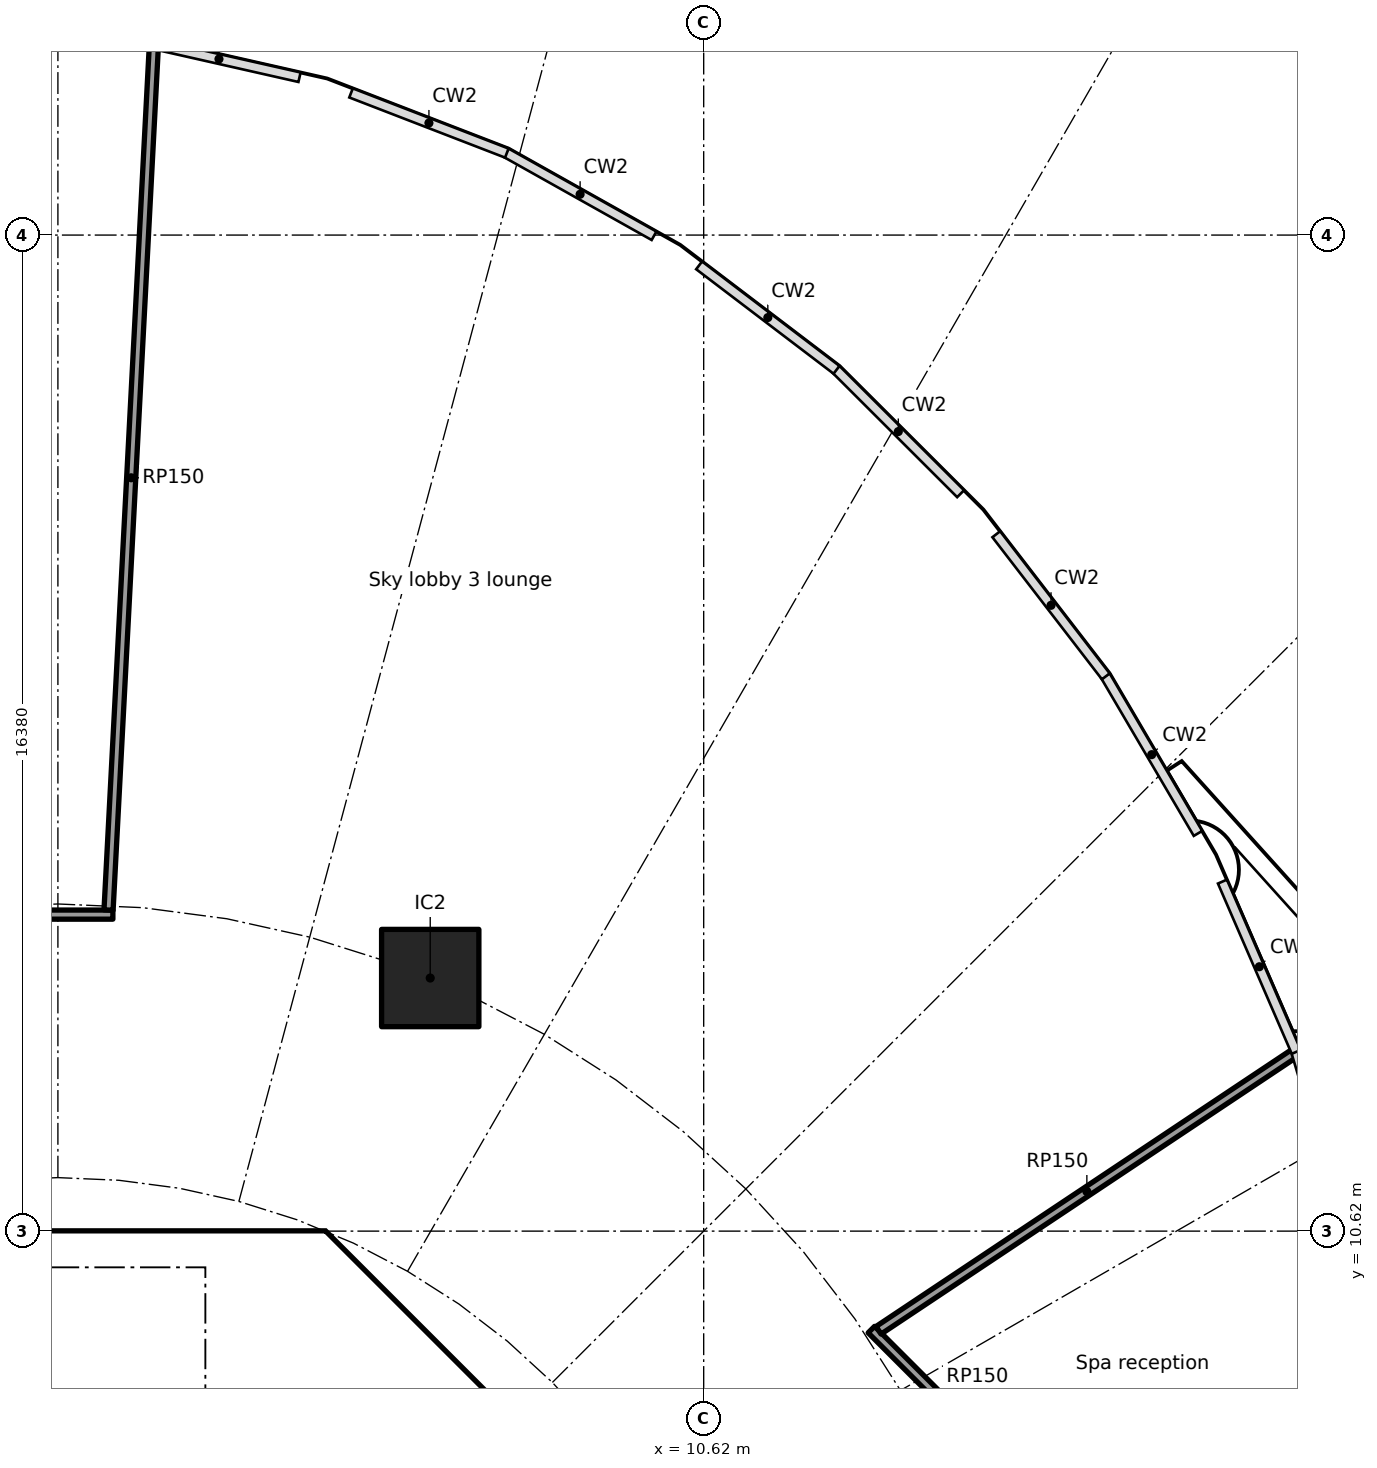
"""IFC4 building model, lengths in metres.
Left out: names, types, materials, properties, quantities, classifications, styles, units other than length and angle.
Written with IfcOpenShell. Run it as: python <this file> out.ifc"""

import sys

from ifc_helpers import new_model, si_unit, direction, frame, frame_2d, origin, origin_2d, place, context, subcontext, project, spatial, polyline, rectangle, outline, extrude, element, fill, save


model = new_model("IFC4")
c1 = context("Model", 3, precision=1e-05, world=origin(), true_north=direction((0.0, 1.0)))
c2 = subcontext(c1, "Body", "Model", "MODEL_VIEW")
j1 = project(units=[si_unit("LENGTHUNIT", "METRE"), si_unit("PLANEANGLEUNIT", "RADIAN")], contexts=[c1])
p1 = place(None, origin())
s1 = spatial("IfcSite", under=j1, at=p1, CompositionType="ELEMENT")
p2 = place(p1, origin())
s2 = spatial("IfcBuilding", under=s1, at=p2, CompositionType="ELEMENT")
p3 = place(p2, frame((0.0, 0.0, 252.9)))
s3 = spatial("IfcBuildingStorey", under=s2, at=p3, CompositionType="ELEMENT", Elevation=252.9)
p4 = place(p3, frame((6.123, 14.782, 0.0), z_axis=(0.0, 0.0, 1.0), x_axis=(1.0, 0.0, 0.0)))
e1 = element("IfcColumn", 1, at=p4, inside=s3, PredefinedType="COLUMN", context=c2, shape_type="SweptSolid", body=[
    extrude(rectangle(XDim=1.6, YDim=1.6, at=origin_2d()), origin(), (0.0, 0.0, 1.0), 5.6),
])
p5 = place(p3, frame((9.988, 4.613, 0.0), z_axis=(0.0, 0.0, 1.0), x_axis=(-0.707106781187, 0.707106781187, 0.0)))
e2 = element("IfcWall", 2, at=p5, inside=s3, PredefinedType="SHEAR", context=c2, shape_type="SweptSolid", body=[
    extrude(rectangle(XDim=7.602, YDim=0.6, at=frame_2d((3.801, 0.0))), origin(), (0.0, 0.0, 1.0), 5.34),
])
p6 = place(p5, frame((3.201, 0.0, 0.0)))
e3 = element("IfcOpeningElement", 3, at=p6, cuts=e2, PredefinedType="OPENING", context=c2, shape_type="SweptSolid", body=[
    extrude(rectangle(XDim=1.2, YDim=2.1, at=frame_2d((0.6, 1.05))), frame((0.0, 0.31, 0.0), z_axis=(0.0, -1.0, 0.0), x_axis=(1.0, 0.0, 0.0)), (0.0, 0.0, 1.0), 0.62),
])
p7 = place(p3, frame((4.0, 7.025, 0.0), z_axis=(0.0, 0.0, 1.0), x_axis=(0.0, 1.0, 0.0)))
e4 = element("IfcWall", 4, at=p7, inside=s3, PredefinedType="SOLIDWALL", context=c2, shape_type="SweptSolid", body=[
    extrude(rectangle(XDim=3.0, YDim=0.2, at=frame_2d((1.5, 0.0))), origin(), (0.0, 0.0, 1.0), 5.34),
])
p8 = place(p7, frame((0.925, 0.0, 0.0)))
e5 = element("IfcOpeningElement", 5, at=p8, cuts=e4, PredefinedType="OPENING", context=c2, shape_type="SweptSolid", body=[
    extrude(rectangle(XDim=1.1, YDim=2.1, at=frame_2d((0.55, 1.05))), frame((0.0, 0.11, 0.0), z_axis=(0.0, -1.0, 0.0), x_axis=(1.0, 0.0, 0.0)), (0.0, 0.0, 1.0), 0.22),
])
p9 = place(p3, origin())
e6 = element("IfcWall", 6, at=p9, inside=s3, PredefinedType="SHEAR", context=c2, shape_type="SweptSolid", body=[
    extrude(outline(polyline([(-4.152, 10.025), (-4.401, 9.776), (-4.825, 10.2), (-4.401, 10.625), (4.401, 10.625), (4.825, 10.2), (4.401, 9.776), (4.152, 10.025), (-4.152, 10.025)])), origin(), (0.0, 0.0, 1.0), 5.34),
])
p10 = place(p3, frame((-6.449, 15.825, 0.0), z_axis=(0.0, 0.0, 1.0), x_axis=(1.0, 0.0, 0.0)))
e7 = element("IfcWall", 7, at=p10, inside=s3, PredefinedType="PARTITIONING", context=c2, shape_type="SweptSolid", body=[
    extrude(rectangle(XDim=7.353, YDim=0.15, at=frame_2d((3.677, 0.0))), origin(), (0.0, 0.0, 1.0), 5.34),
])
p11 = place(p10, frame((2.686, 0.0, 0.0)))
e8 = element("IfcOpeningElement", 8, at=p11, cuts=e7, PredefinedType="OPENING", context=c2, shape_type="SweptSolid", body=[
    extrude(rectangle(XDim=1.8, YDim=2.1, at=frame_2d((0.9, 1.05))), frame((0.0, 0.085, 0.0), z_axis=(0.0, -1.0, 0.0), x_axis=(1.0, 0.0, 0.0)), (0.0, 0.0, 1.0), 0.17),
])
p12 = place(p3, frame((0.833, 15.9, 0.0), z_axis=(0.0, 0.0, 1.0), x_axis=(0.052336520132, 0.998629505202, 0.0)))
e9 = element("IfcWall", 9, at=p12, inside=s3, PredefinedType="PARTITIONING", context=c2, shape_type="SweptSolid", body=[
    extrude(rectangle(XDim=14.237, YDim=0.15, at=frame_2d((7.119, 0.0))), origin(), (0.0, 0.0, 1.0), 5.34),
])
p13 = place(p3, frame((13.378, 9.001, 0.0), z_axis=(0.0, 0.0, 1.0), x_axis=(0.707243697976, -0.70696983788, 0.0)))
e10 = element("IfcWall", 10, at=p13, inside=s3, PredefinedType="PARTITIONING", context=c2, shape_type="SweptSolid", body=[
    extrude(rectangle(XDim=3.566, YDim=0.15, at=frame_2d((1.783, 0.0))), origin(), (0.0, 0.0, 1.0), 5.34),
])
p14 = place(p3, frame((20.347, 13.554, 0.0), z_axis=(0.0, 0.0, 1.0), x_axis=(-0.832246423535, -0.554405889681, 0.0)))
e11 = element("IfcWall", 11, at=p14, inside=s3, PredefinedType="PARTITIONING", context=c2, shape_type="SweptSolid", body=[
    extrude(rectangle(XDim=8.233, YDim=0.15, at=frame_2d((4.116, 0.0))), origin(), (0.0, 0.0, 1.0), 5.34),
])
p15 = place(p8, origin())
e12 = element("IfcDoor", 12, at=p15, inside=s3, OperationType="SINGLE_SWING_LEFT", PredefinedType="DOOR", context=c2, shape_type="SweptSolid", body=[
    extrude(rectangle(XDim=1.1, YDim=2.1, at=frame_2d((0.55, 1.05))), frame((0.0, 0.025, 0.0), z_axis=(0.0, -1.0, 0.0), x_axis=(1.0, 0.0, 0.0)), (0.0, 0.0, 1.0), 0.05),
])
fill(e5, e12)
save(model, sys.argv[1])
